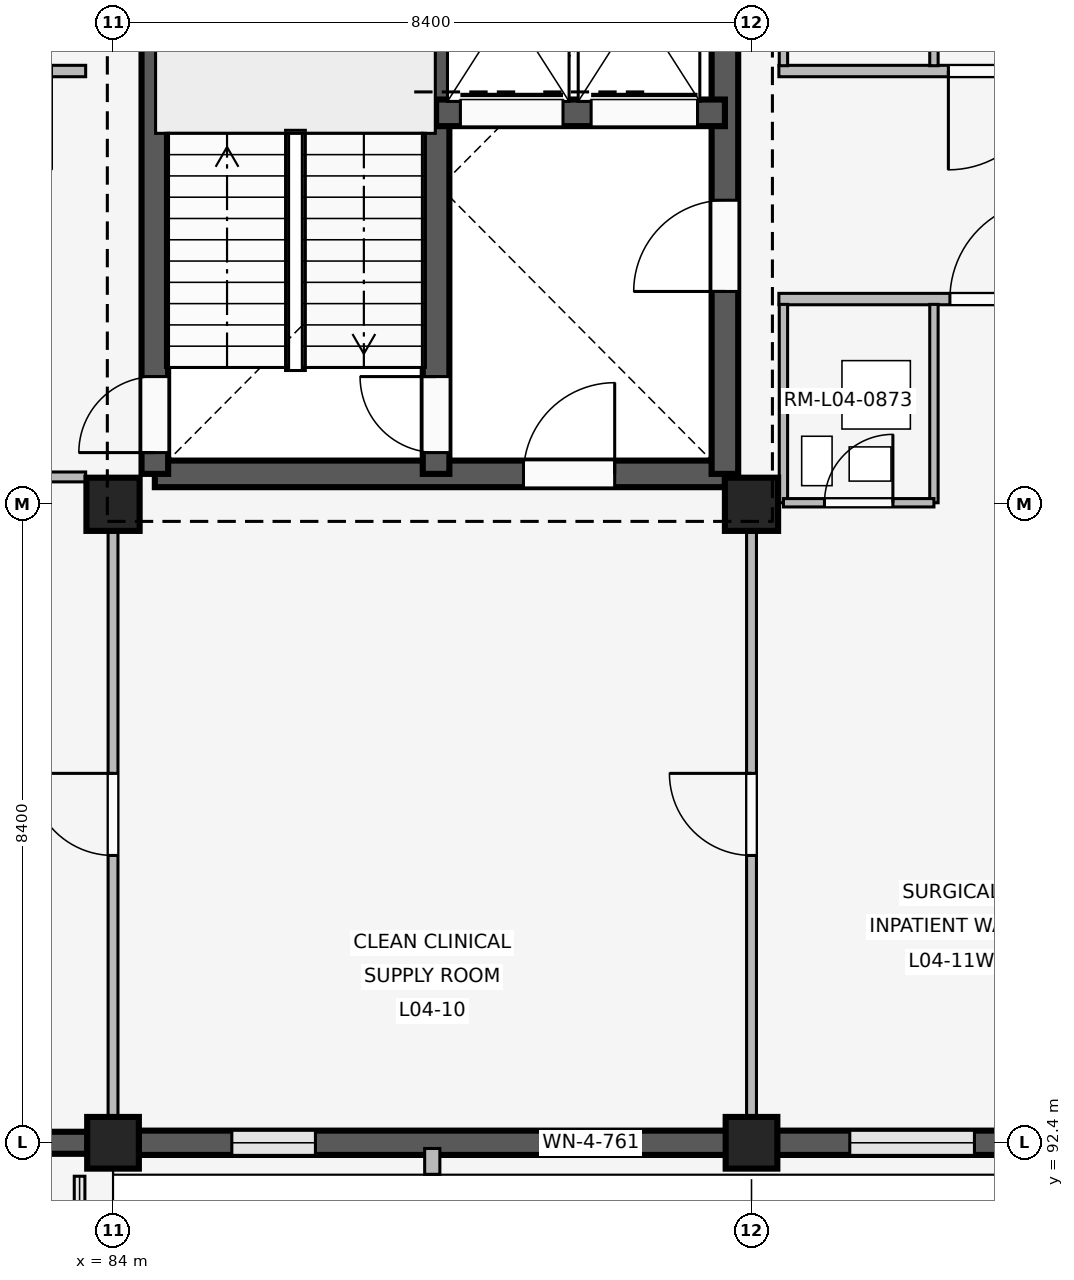
"""IFC4 building model, lengths in metres.
Left out: names, types, materials, properties, quantities, classifications, styles, units other than length and angle.
Written with IfcOpenShell. Run it as: python <this file> out.ifc"""

import sys

from ifc_helpers import new_model, si_unit, direction, frame, frame_2d, origin, origin_2d, place, context, subcontext, project, spatial, rectangle, extrude, element, fill, save


model = new_model("IFC4")
c1 = context("Model", 3, precision=1e-05, world=origin(), true_north=direction((0.0, 1.0)))
c2 = subcontext(c1, "Body", "Model", "MODEL_VIEW")
j1 = project(units=[si_unit("LENGTHUNIT", "METRE"), si_unit("PLANEANGLEUNIT", "RADIAN")], contexts=[c1])
p1 = place(None, origin())
s1 = spatial("IfcSite", under=j1, at=p1, CompositionType="ELEMENT")
p2 = place(p1, origin())
s2 = spatial("IfcBuilding", under=s1, at=p2, CompositionType="ELEMENT")
p3 = place(p2, frame((0.0, 0.0, 16.2)))
s3 = spatial("IfcBuildingStorey", under=s2, at=p3, CompositionType="ELEMENT", Elevation=16.2)
p4 = place(p3, frame((84.0, 92.4, 0.0), z_axis=(0.0, 0.0, 1.0), x_axis=(1.0, 0.0, 0.0)))
e1 = element("IfcColumn", 1, at=p4, inside=s3, PredefinedType="COLUMN", context=c2, shape_type="SweptSolid", body=[
    extrude(rectangle(XDim=0.68, YDim=0.68, at=origin_2d()), origin(), (0.0, 0.0, 1.0), 4.2),
])
p5 = place(p3, frame((84.0, 100.8, 0.0), z_axis=(0.0, 0.0, 1.0), x_axis=(1.0, 0.0, 0.0)))
e2 = element("IfcColumn", 2, at=p5, inside=s3, PredefinedType="COLUMN", context=c2, shape_type="SweptSolid", body=[
    extrude(rectangle(XDim=0.7, YDim=0.7, at=origin_2d()), origin(), (0.0, 0.0, 1.0), 4.2),
])
p6 = place(p3, frame((92.4, 92.4, 0.0), z_axis=(0.0, 0.0, 1.0), x_axis=(1.0, 0.0, 0.0)))
e3 = element("IfcColumn", 3, at=p6, inside=s3, PredefinedType="COLUMN", context=c2, shape_type="SweptSolid", body=[
    extrude(rectangle(XDim=0.68, YDim=0.68, at=origin_2d()), origin(), (0.0, 0.0, 1.0), 4.2),
])
p7 = place(p3, frame((92.4, 100.8, 0.0), z_axis=(0.0, 0.0, 1.0), x_axis=(1.0, 0.0, 0.0)))
e4 = element("IfcColumn", 4, at=p7, inside=s3, PredefinedType="COLUMN", context=c2, shape_type="SweptSolid", body=[
    extrude(rectangle(XDim=0.7, YDim=0.7, at=origin_2d()), origin(), (0.0, 0.0, 1.0), 4.2),
])
p8 = place(p3, frame((83.665, 92.4, 0.0), z_axis=(0.0, 0.0, 1.0), x_axis=(-1.0, 0.0, 0.0)))
e5 = element("IfcWall", 5, at=p8, inside=s3, PredefinedType="SOLIDWALL", context=c2, shape_type="SweptSolid", body=[
    extrude(rectangle(XDim=7.73, YDim=0.29, at=frame_2d((3.865, 0.0))), origin(), (0.0, 0.0, 1.0), 3.32),
])
p9 = place(p8, frame((2.915, 0.0, 0.0)))
e6 = element("IfcOpeningElement", 6, at=p9, cuts=e5, PredefinedType="OPENING", context=c2, shape_type="SweptSolid", body=[
    extrude(rectangle(XDim=1.9, YDim=2.4, at=frame_2d((0.95, 1.2))), frame((0.0, 0.155, 0.0), z_axis=(0.0, -1.0, 0.0), x_axis=(1.0, 0.0, 0.0)), (0.0, 0.0, 1.0), 0.31),
])
p10 = place(p3, frame((92.065, 92.4, 0.0), z_axis=(0.0, 0.0, 1.0), x_axis=(-1.0, 0.0, 0.0)))
e7 = element("IfcWall", 7, at=p10, inside=s3, PredefinedType="SOLIDWALL", context=c2, shape_type="SweptSolid", body=[
    extrude(rectangle(XDim=7.73, YDim=0.32, at=frame_2d((3.865, 0.0))), origin(), (0.0, 0.0, 1.0), 3.32),
])
p11 = place(p10, frame((1.228, 0.0, 0.85)))
e8 = element("IfcOpeningElement", 8, at=p11, cuts=e7, PredefinedType="OPENING", context=c2, shape_type="SweptSolid", body=[
    extrude(rectangle(XDim=1.1, YDim=1.6, at=frame_2d((0.55, 0.8))), frame((0.0, 0.17, 0.0), z_axis=(0.0, -1.0, 0.0), x_axis=(1.0, 0.0, 0.0)), (0.0, 0.0, 1.0), 0.34),
])
p12 = place(p10, frame((5.402, 0.0, 0.85)))
e9 = element("IfcOpeningElement", 9, at=p12, cuts=e7, PredefinedType="OPENING", context=c2, shape_type="SweptSolid", body=[
    extrude(rectangle(XDim=1.1, YDim=1.6, at=frame_2d((0.55, 0.8))), frame((0.0, 0.17, 0.0), z_axis=(0.0, -1.0, 0.0), x_axis=(1.0, 0.0, 0.0)), (0.0, 0.0, 1.0), 0.34),
])
p13 = place(p3, frame((88.2, 92.325, 0.0), z_axis=(0.0, 0.0, 1.0), x_axis=(0.0, -1.0, 0.0)))
e10 = element("IfcWall", 10, at=p13, inside=s3, PredefinedType="ELEMENTEDWALL", context=c2, shape_type="SweptSolid", body=[
    extrude(rectangle(XDim=0.34, YDim=0.2, at=frame_2d((0.17, 0.0))), origin(), (0.0, 0.0, 1.0), 3.3),
])
p14 = place(p3, frame((100.465, 92.4, 0.0), z_axis=(0.0, 0.0, 1.0), x_axis=(-1.0, 0.0, 0.0)))
e11 = element("IfcWall", 11, at=p14, inside=s3, PredefinedType="SOLIDWALL", context=c2, shape_type="SweptSolid", body=[
    extrude(rectangle(XDim=7.73, YDim=0.32, at=frame_2d((3.865, 0.0))), origin(), (0.0, 0.0, 1.0), 3.32),
])
p15 = place(p14, frame((0.958, 0.0, 0.85)))
e12 = element("IfcOpeningElement", 12, at=p15, cuts=e11, PredefinedType="OPENING", context=c2, shape_type="SweptSolid", body=[
    extrude(rectangle(XDim=1.64, YDim=1.75, at=frame_2d((0.82, 0.875))), frame((0.0, 0.17, 0.0), z_axis=(0.0, -1.0, 0.0), x_axis=(1.0, 0.0, 0.0)), (0.0, 0.0, 1.0), 0.34),
])
p16 = place(p14, frame((5.132, 0.0, 0.85)))
e13 = element("IfcOpeningElement", 13, at=p16, cuts=e11, PredefinedType="OPENING", context=c2, shape_type="SweptSolid", body=[
    extrude(rectangle(XDim=1.64, YDim=1.75, at=frame_2d((0.82, 0.875))), frame((0.0, 0.17, 0.0), z_axis=(0.0, -1.0, 0.0), x_axis=(1.0, 0.0, 0.0)), (0.0, 0.0, 1.0), 0.34),
])
p17 = place(p3, frame((84.55, 101.2, 0.0), z_axis=(0.0, 0.0, 1.0), x_axis=(1.0, 0.0, 0.0)))
e14 = element("IfcWall", 14, at=p17, inside=s3, PredefinedType="SHEAR", context=c2, shape_type="SweptSolid", body=[
    extrude(rectangle(XDim=7.5, YDim=0.35, at=frame_2d((3.75, 0.0))), origin(), (0.0, 0.0, 1.0), 3.92),
])
p18 = place(p17, frame((4.85, 0.0, 0.0)))
e15 = element("IfcOpeningElement", 15, at=p18, cuts=e14, PredefinedType="OPENING", context=c2, shape_type="SweptSolid", body=[
    extrude(rectangle(XDim=1.2, YDim=2.2, at=frame_2d((0.6, 1.1))), frame((0.0, 0.185, 0.0), z_axis=(0.0, -1.0, 0.0), x_axis=(1.0, 0.0, 0.0)), (0.0, 0.0, 1.0), 0.37),
])
p19 = place(p3, frame((84.55, 101.2, 0.0), z_axis=(0.0, 0.0, 1.0), x_axis=(0.0, 1.0, 0.0)))
e16 = element("IfcWall", 16, at=p19, inside=s3, PredefinedType="SHEAR", context=c2, shape_type="SweptSolid", body=[
    extrude(rectangle(XDim=7.55, YDim=0.35, at=frame_2d((3.775, 0.0))), origin(), (0.0, 0.0, 1.0), 3.92),
])
p20 = place(p19, frame((0.28, 0.0, 0.0)))
e17 = element("IfcOpeningElement", 17, at=p20, cuts=e16, PredefinedType="OPENING", context=c2, shape_type="SweptSolid", body=[
    extrude(rectangle(XDim=1.0, YDim=2.15, at=frame_2d((0.5, 1.075))), frame((0.0, 0.185, 0.0), z_axis=(0.0, -1.0, 0.0), x_axis=(1.0, 0.0, 0.0)), (0.0, 0.0, 1.0), 0.37),
])
p21 = place(p3, frame((92.05, 101.2, 0.0), z_axis=(0.0, 0.0, 1.0), x_axis=(0.0, 1.0, 0.0)))
e18 = element("IfcWall", 18, at=p21, inside=s3, PredefinedType="SHEAR", context=c2, shape_type="SweptSolid", body=[
    extrude(rectangle(XDim=7.55, YDim=0.35, at=frame_2d((3.775, 0.0))), origin(), (0.0, 0.0, 1.0), 3.92),
])
p22 = place(p21, frame((2.4, 0.0, 0.0)))
e19 = element("IfcOpeningElement", 19, at=p22, cuts=e18, PredefinedType="OPENING", context=c2, shape_type="SweptSolid", body=[
    extrude(rectangle(XDim=1.2, YDim=2.2, at=frame_2d((0.6, 1.1))), frame((0.0, 0.185, 0.0), z_axis=(0.0, -1.0, 0.0), x_axis=(1.0, 0.0, 0.0)), (0.0, 0.0, 1.0), 0.37),
])
p23 = place(p3, frame((88.25, 101.2, 0.0), z_axis=(0.0, 0.0, 1.0), x_axis=(0.0, 1.0, 0.0)))
e20 = element("IfcWall", 20, at=p23, inside=s3, PredefinedType="SHEAR", context=c2, shape_type="SweptSolid", body=[
    extrude(rectangle(XDim=7.55, YDim=0.35, at=frame_2d((3.775, 0.0))), origin(), (0.0, 0.0, 1.0), 3.92),
])
p24 = place(p23, frame((0.28, 0.0, 0.0)))
e21 = element("IfcOpeningElement", 21, at=p24, cuts=e20, PredefinedType="OPENING", context=c2, shape_type="SweptSolid", body=[
    extrude(rectangle(XDim=1.0, YDim=2.15, at=frame_2d((0.5, 1.075))), frame((0.0, 0.185, 0.0), z_axis=(0.0, -1.0, 0.0), x_axis=(1.0, 0.0, 0.0)), (0.0, 0.0, 1.0), 0.37),
])
p25 = place(p3, frame((88.25, 105.95, 0.0), z_axis=(0.0, 0.0, 1.0), x_axis=(1.0, 0.0, 0.0)))
e22 = element("IfcWall", 22, at=p25, inside=s3, PredefinedType="SHEAR", context=c2, shape_type="SweptSolid", body=[
    extrude(rectangle(XDim=3.8, YDim=0.35, at=frame_2d((1.9, 0.0))), origin(), (0.0, 0.0, 1.0), 3.92),
])
p26 = place(p25, frame((0.32, 0.0, 0.0)))
e23 = element("IfcOpeningElement", 23, at=p26, cuts=e22, PredefinedType="OPENING", context=c2, shape_type="SweptSolid", body=[
    extrude(rectangle(XDim=1.35, YDim=2.25, at=frame_2d((0.675, 1.125))), frame((0.0, 0.185, 0.0), z_axis=(0.0, -1.0, 0.0), x_axis=(1.0, 0.0, 0.0)), (0.0, 0.0, 1.0), 0.37),
])
p27 = place(p25, frame((2.04, 0.0, 0.0)))
e24 = element("IfcOpeningElement", 24, at=p27, cuts=e22, PredefinedType="OPENING", context=c2, shape_type="SweptSolid", body=[
    extrude(rectangle(XDim=1.4, YDim=2.25, at=frame_2d((0.7, 1.125))), frame((0.0, 0.185, 0.0), z_axis=(0.0, -1.0, 0.0), x_axis=(1.0, 0.0, 0.0)), (0.0, 0.0, 1.0), 0.37),
])
p28 = place(p3, frame((81.46, 101.16, 0.0), z_axis=(0.0, 0.0, 1.0), x_axis=(1.0, 0.0, 0.0)))
e25 = element("IfcWall", 25, at=p28, inside=s3, PredefinedType="PARTITIONING", context=c2, shape_type="SweptSolid", body=[
    extrude(rectangle(XDim=2.18, YDim=0.13, at=frame_2d((1.09, 0.0))), origin(), (0.0, 0.0, 1.0), 3.3),
])
p29 = place(p3, frame((83.64, 106.5, 0.0), z_axis=(0.0, 0.0, 1.0), x_axis=(-1.0, 0.0, 0.0)))
e26 = element("IfcWall", 26, at=p29, inside=s3, PredefinedType="PARTITIONING", context=c2, shape_type="SweptSolid", body=[
    extrude(rectangle(XDim=7.96, YDim=0.15, at=frame_2d((3.98, 0.0))), origin(), (0.0, 0.0, 1.0), 3.3),
])
p30 = place(p29, frame((0.45, 0.0, 0.0)))
e27 = element("IfcOpeningElement", 27, at=p30, cuts=e26, PredefinedType="OPENING", context=c2, shape_type="SweptSolid", body=[
    extrude(rectangle(XDim=1.3, YDim=2.25, at=frame_2d((0.65, 1.125))), frame((0.0, 0.085, 0.0), z_axis=(0.0, -1.0, 0.0), x_axis=(1.0, 0.0, 0.0)), (0.0, 0.0, 1.0), 0.17),
])
p31 = place(p29, frame((4.15, 0.0, 0.0)))
e28 = element("IfcOpeningElement", 28, at=p31, cuts=e26, PredefinedType="OPENING", context=c2, shape_type="SweptSolid", body=[
    extrude(rectangle(XDim=1.3, YDim=2.25, at=frame_2d((0.65, 1.125))), frame((0.0, 0.085, 0.0), z_axis=(0.0, -1.0, 0.0), x_axis=(1.0, 0.0, 0.0)), (0.0, 0.0, 1.0), 0.17),
])
p32 = place(p3, frame((84.0, 92.54, 0.0), z_axis=(0.0, 0.0, 1.0), x_axis=(0.0, 1.0, 0.0)))
e29 = element("IfcWall", 29, at=p32, inside=s3, PredefinedType="PARTITIONING", context=c2, shape_type="SweptSolid", body=[
    extrude(rectangle(XDim=8.21, YDim=0.13, at=frame_2d((4.105, 0.0))), origin(), (0.0, 0.0, 1.0), 3.3),
])
p33 = place(p32, frame((3.64, 0.0, 0.0)))
e30 = element("IfcOpeningElement", 30, at=p33, cuts=e29, PredefinedType="OPENING", context=c2, shape_type="SweptSolid", body=[
    extrude(rectangle(XDim=1.08, YDim=2.15, at=frame_2d((0.54, 1.075))), frame((0.0, 0.075, 0.0), z_axis=(0.0, -1.0, 0.0), x_axis=(1.0, 0.0, 0.0)), (0.0, 0.0, 1.0), 0.15),
])
p34 = place(p3, frame((92.4, 92.54, 0.0), z_axis=(0.0, 0.0, 1.0), x_axis=(0.0, 1.0, 0.0)))
e31 = element("IfcWall", 31, at=p34, inside=s3, PredefinedType="PARTITIONING", context=c2, shape_type="SweptSolid", body=[
    extrude(rectangle(XDim=8.21, YDim=0.13, at=frame_2d((4.105, 0.0))), origin(), (0.0, 0.0, 1.0), 3.3),
])
p35 = place(p34, frame((3.64, 0.0, 0.0)))
e32 = element("IfcOpeningElement", 32, at=p35, cuts=e31, PredefinedType="OPENING", context=c2, shape_type="SweptSolid", body=[
    extrude(rectangle(XDim=1.08, YDim=2.15, at=frame_2d((0.54, 1.075))), frame((0.0, 0.075, 0.0), z_axis=(0.0, -1.0, 0.0), x_axis=(1.0, 0.0, 0.0)), (0.0, 0.0, 1.0), 0.15),
])
p36 = place(p3, frame((92.76, 103.5, 0.0), z_axis=(0.0, 0.0, 1.0), x_axis=(1.0, 0.0, 0.0)))
e33 = element("IfcWall", 33, at=p36, inside=s3, PredefinedType="PARTITIONING", context=c2, shape_type="SweptSolid", body=[
    extrude(rectangle(XDim=7.96, YDim=0.15, at=frame_2d((3.98, 0.0))), origin(), (0.0, 0.0, 1.0), 3.3),
])
p37 = place(p36, frame((2.25, 0.0, 0.0)))
e34 = element("IfcOpeningElement", 34, at=p37, cuts=e33, PredefinedType="OPENING", context=c2, shape_type="SweptSolid", body=[
    extrude(rectangle(XDim=1.3, YDim=2.25, at=frame_2d((0.65, 1.125))), frame((0.0, 0.085, 0.0), z_axis=(0.0, -1.0, 0.0), x_axis=(1.0, 0.0, 0.0)), (0.0, 0.0, 1.0), 0.17),
])
p38 = place(p36, frame((5.95, 0.0, 0.0)))
e35 = element("IfcOpeningElement", 35, at=p38, cuts=e33, PredefinedType="OPENING", context=c2, shape_type="SweptSolid", body=[
    extrude(rectangle(XDim=1.3, YDim=2.25, at=frame_2d((0.65, 1.125))), frame((0.0, 0.085, 0.0), z_axis=(0.0, -1.0, 0.0), x_axis=(1.0, 0.0, 0.0)), (0.0, 0.0, 1.0), 0.17),
])
for number, where, z_axis, x_axis in (
    (36, (92.82, 100.82, 0.0), (0.0, 0.0, 1.0), (0.0, 1.0, 0.0)),
    (37, (94.8, 100.82, 0.0), (0.0, 0.0, 1.0), (0.0, 1.0, 0.0)),
):
    element("IfcWall", number, at=place(p3, frame(where, z_axis=z_axis, x_axis=x_axis)), inside=s3, PredefinedType="PARTITIONING", context=c2, shape_type="SweptSolid", body=[
        extrude(rectangle(XDim=2.61, YDim=0.11, at=frame_2d((1.305, 0.0))), origin(), (0.0, 0.0, 1.0), 3.3),
    ])
p39 = place(p3, frame((92.82, 100.82, 0.0), z_axis=(0.0, 0.0, 1.0), x_axis=(1.0, 0.0, 0.0)))
e38 = element("IfcWall", 38, at=p39, inside=s3, PredefinedType="PARTITIONING", context=c2, shape_type="SweptSolid", body=[
    extrude(rectangle(XDim=1.98, YDim=0.11, at=frame_2d((0.99, 0.0))), origin(), (0.0, 0.0, 1.0), 3.3),
])
p40 = place(p39, frame((0.54, 0.0, 0.0)))
e39 = element("IfcOpeningElement", 39, at=p40, cuts=e38, PredefinedType="OPENING", context=c2, shape_type="SweptSolid", body=[
    extrude(rectangle(XDim=0.9, YDim=2.1, at=frame_2d((0.45, 1.05))), frame((0.0, 0.065, 0.0), z_axis=(0.0, -1.0, 0.0), x_axis=(1.0, 0.0, 0.0)), (0.0, 0.0, 1.0), 0.13),
])
p41 = place(p3, frame((100.72, 106.5, 0.0), z_axis=(0.0, 0.0, 1.0), x_axis=(-1.0, 0.0, 0.0)))
e40 = element("IfcWall", 40, at=p41, inside=s3, PredefinedType="PARTITIONING", context=c2, shape_type="SweptSolid", body=[
    extrude(rectangle(XDim=7.96, YDim=0.15, at=frame_2d((3.98, 0.0))), origin(), (0.0, 0.0, 1.0), 3.3),
])
p42 = place(p41, frame((0.73, 0.0, 0.0)))
e41 = element("IfcOpeningElement", 41, at=p42, cuts=e40, PredefinedType="OPENING", context=c2, shape_type="SweptSolid", body=[
    extrude(rectangle(XDim=1.3, YDim=2.25, at=frame_2d((0.65, 1.125))), frame((0.0, 0.085, 0.0), z_axis=(0.0, -1.0, 0.0), x_axis=(1.0, 0.0, 0.0)), (0.0, 0.0, 1.0), 0.17),
])
p43 = place(p41, frame((4.43, 0.0, 0.0)))
e42 = element("IfcOpeningElement", 42, at=p43, cuts=e40, PredefinedType="OPENING", context=c2, shape_type="SweptSolid", body=[
    extrude(rectangle(XDim=1.3, YDim=2.25, at=frame_2d((0.65, 1.125))), frame((0.0, 0.085, 0.0), z_axis=(0.0, -1.0, 0.0), x_axis=(1.0, 0.0, 0.0)), (0.0, 0.0, 1.0), 0.17),
])
for number, where, z_axis, x_axis in (
    (43, (92.82, 106.57, 0.0), (0.0, 0.0, 1.0), (0.0, 1.0, 0.0)),
    (44, (94.8, 106.57, 0.0), (0.0, 0.0, 1.0), (0.0, 1.0, 0.0)),
):
    element("IfcWall", number, at=place(p3, frame(where, z_axis=z_axis, x_axis=x_axis)), inside=s3, PredefinedType="PARTITIONING", context=c2, shape_type="SweptSolid", body=[
        extrude(rectangle(XDim=2.61, YDim=0.11, at=frame_2d((1.305, 0.0))), origin(), (0.0, 0.0, 1.0), 3.3),
    ])
p44 = place(p11, origin())
e45 = element("IfcWindow", 45, at=p44, inside=s3, PartitioningType="SINGLE_PANEL", PredefinedType="WINDOW", context=c2, shape_type="SweptSolid", body=[
    extrude(rectangle(XDim=1.1, YDim=1.6, at=frame_2d((0.55, 0.8))), frame((0.0, 0.03, 0.0), z_axis=(0.0, -1.0, 0.0), x_axis=(1.0, 0.0, 0.0)), (0.0, 0.0, 1.0), 0.06),
])
fill(e8, e45)
p45 = place(p12, origin())
e46 = element("IfcWindow", 46, at=p45, inside=s3, PartitioningType="SINGLE_PANEL", PredefinedType="WINDOW", context=c2, shape_type="SweptSolid", body=[
    extrude(rectangle(XDim=1.1, YDim=1.6, at=frame_2d((0.55, 0.8))), frame((0.0, 0.03, 0.0), z_axis=(0.0, -1.0, 0.0), x_axis=(1.0, 0.0, 0.0)), (0.0, 0.0, 1.0), 0.06),
])
fill(e9, e46)
p46 = place(p16, origin())
e47 = element("IfcWindow", 47, at=p46, inside=s3, PartitioningType="SINGLE_PANEL", PredefinedType="WINDOW", context=c2, shape_type="SweptSolid", body=[
    extrude(rectangle(XDim=1.64, YDim=1.75, at=frame_2d((0.82, 0.875))), frame((0.0, 0.03, 0.0), z_axis=(0.0, -1.0, 0.0), x_axis=(1.0, 0.0, 0.0)), (0.0, 0.0, 1.0), 0.06),
])
fill(e13, e47)
p47 = place(p22, origin())
e48 = element("IfcDoor", 48, at=p47, inside=s3, OperationType="SINGLE_SWING_LEFT", PredefinedType="DOOR", context=c2, shape_type="SweptSolid", body=[
    extrude(rectangle(XDim=1.2, YDim=2.2, at=frame_2d((0.6, 1.1))), frame((0.0, 0.025, 0.0), z_axis=(0.0, -1.0, 0.0), x_axis=(1.0, 0.0, 0.0)), (0.0, 0.0, 1.0), 0.05),
])
fill(e19, e48)
p48 = place(p18, origin())
e49 = element("IfcDoor", 49, at=p48, inside=s3, OperationType="SINGLE_SWING_RIGHT", PredefinedType="DOOR", context=c2, shape_type="SweptSolid", body=[
    extrude(rectangle(XDim=1.2, YDim=2.2, at=frame_2d((0.6, 1.1))), frame((0.0, 0.025, 0.0), z_axis=(0.0, -1.0, 0.0), x_axis=(1.0, 0.0, 0.0)), (0.0, 0.0, 1.0), 0.05),
])
fill(e15, e49)
p49 = place(p20, origin())
e50 = element("IfcDoor", 50, at=p49, inside=s3, OperationType="SINGLE_SWING_LEFT", PredefinedType="DOOR", context=c2, shape_type="SweptSolid", body=[
    extrude(rectangle(XDim=1.0, YDim=2.15, at=frame_2d((0.5, 1.075))), frame((0.0, 0.025, 0.0), z_axis=(0.0, -1.0, 0.0), x_axis=(1.0, 0.0, 0.0)), (0.0, 0.0, 1.0), 0.05),
])
fill(e17, e50)
p50 = place(p24, origin())
e51 = element("IfcDoor", 51, at=p50, inside=s3, OperationType="SINGLE_SWING_RIGHT", PredefinedType="DOOR", context=c2, shape_type="SweptSolid", body=[
    extrude(rectangle(XDim=1.0, YDim=2.15, at=frame_2d((0.5, 1.075))), frame((0.0, 0.025, 0.0), z_axis=(0.0, -1.0, 0.0), x_axis=(1.0, 0.0, 0.0)), (0.0, 0.0, 1.0), 0.05),
])
fill(e21, e51)
p51 = place(p26, origin())
e52 = element("IfcDoor", 52, at=p51, inside=s3, OperationType="SLIDING_TO_LEFT", PredefinedType="DOOR", context=c2, shape_type="SweptSolid", body=[
    extrude(rectangle(XDim=1.35, YDim=2.25, at=frame_2d((0.675, 1.125))), frame((0.0, 0.025, 0.0), z_axis=(0.0, -1.0, 0.0), x_axis=(1.0, 0.0, 0.0)), (0.0, 0.0, 1.0), 0.05),
])
fill(e23, e52)
p52 = place(p27, origin())
e53 = element("IfcDoor", 53, at=p52, inside=s3, OperationType="SLIDING_TO_LEFT", PredefinedType="DOOR", context=c2, shape_type="SweptSolid", body=[
    extrude(rectangle(XDim=1.4, YDim=2.25, at=frame_2d((0.7, 1.125))), frame((0.0, 0.025, 0.0), z_axis=(0.0, -1.0, 0.0), x_axis=(1.0, 0.0, 0.0)), (0.0, 0.0, 1.0), 0.05),
])
fill(e24, e53)
p53 = place(p33, origin())
e54 = element("IfcDoor", 54, at=p53, inside=s3, OperationType="SINGLE_SWING_RIGHT", PredefinedType="DOOR", context=c2, shape_type="SweptSolid", body=[
    extrude(rectangle(XDim=1.08, YDim=2.15, at=frame_2d((0.54, 1.075))), frame((0.0, 0.025, 0.0), z_axis=(0.0, -1.0, 0.0), x_axis=(1.0, 0.0, 0.0)), (0.0, 0.0, 1.0), 0.05),
])
fill(e30, e54)
p54 = place(p35, origin())
e55 = element("IfcDoor", 55, at=p54, inside=s3, OperationType="SINGLE_SWING_RIGHT", PredefinedType="DOOR", context=c2, shape_type="SweptSolid", body=[
    extrude(rectangle(XDim=1.08, YDim=2.15, at=frame_2d((0.54, 1.075))), frame((0.0, 0.025, 0.0), z_axis=(0.0, -1.0, 0.0), x_axis=(1.0, 0.0, 0.0)), (0.0, 0.0, 1.0), 0.05),
])
fill(e32, e55)
p55 = place(p37, origin())
e56 = element("IfcDoor", 56, at=p55, inside=s3, OperationType="SINGLE_SWING_RIGHT", PredefinedType="DOOR", context=c2, shape_type="SweptSolid", body=[
    extrude(rectangle(XDim=1.3, YDim=2.25, at=frame_2d((0.65, 1.125))), frame((0.0, 0.025, 0.0), z_axis=(0.0, -1.0, 0.0), x_axis=(1.0, 0.0, 0.0)), (0.0, 0.0, 1.0), 0.05),
])
fill(e34, e56)
p56 = place(p40, origin())
e57 = element("IfcDoor", 57, at=p56, inside=s3, OperationType="SINGLE_SWING_RIGHT", PredefinedType="DOOR", context=c2, shape_type="SweptSolid", body=[
    extrude(rectangle(XDim=0.9, YDim=2.1, at=frame_2d((0.45, 1.05))), frame((0.0, 0.025, 0.0), z_axis=(0.0, -1.0, 0.0), x_axis=(1.0, 0.0, 0.0)), (0.0, 0.0, 1.0), 0.05),
])
fill(e39, e57)
p57 = place(p43, origin())
e58 = element("IfcDoor", 58, at=p57, inside=s3, OperationType="SINGLE_SWING_RIGHT", PredefinedType="DOOR", context=c2, shape_type="SweptSolid", body=[
    extrude(rectangle(XDim=1.3, YDim=2.25, at=frame_2d((0.65, 1.125))), frame((0.0, 0.025, 0.0), z_axis=(0.0, -1.0, 0.0), x_axis=(1.0, 0.0, 0.0)), (0.0, 0.0, 1.0), 0.05),
])
fill(e42, e58)
save(model, sys.argv[1])
